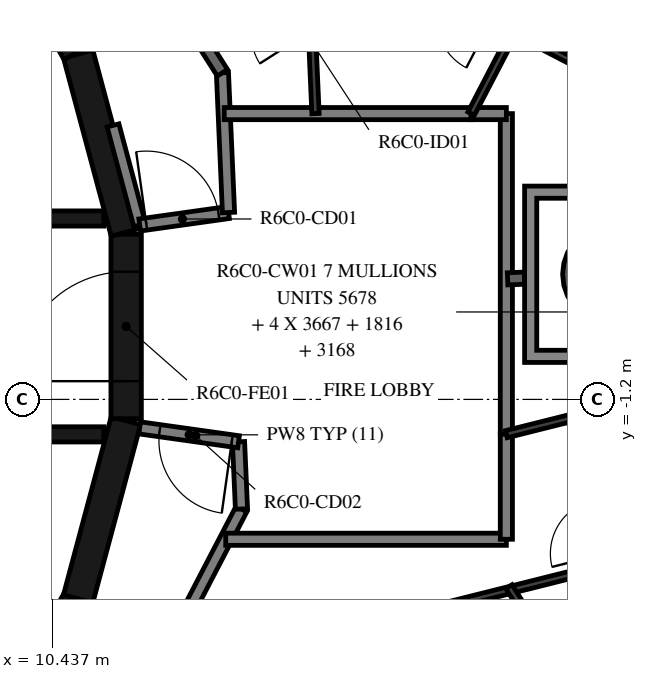
"""IFC4 building model, lengths in metres.
Left out: names, types, materials, properties, quantities, classifications, styles, units other than length and angle.
Written with IfcOpenShell. Run it as: python <this file> out.ifc"""

import sys

from ifc_helpers import new_model, si_unit, direction, frame, frame_2d, origin, origin_2d, place, context, subcontext, project, spatial, polyline, rectangle, hollow_circle, outline, extrude, element, fill, save


model = new_model("IFC4")
c1 = context("Model", 3, precision=1e-05, world=origin(), true_north=direction((0.0, 1.0)))
c2 = subcontext(c1, "Body", "Model", "MODEL_VIEW")
j1 = project(units=[si_unit("LENGTHUNIT", "METRE"), si_unit("PLANEANGLEUNIT", "RADIAN")], contexts=[c1])
p1 = place(None, origin())
s1 = spatial("IfcSite", under=j1, at=p1, CompositionType="ELEMENT")
p2 = place(p1, origin())
s2 = spatial("IfcBuilding", under=s1, at=p2, CompositionType="ELEMENT")
p3 = place(p2, frame((0.0, 0.0, 254.7)))
s3 = spatial("IfcBuildingStorey", under=s2, at=p3, CompositionType="ELEMENT", Elevation=254.7)
p4 = place(p3, frame((19.65, 0.858, -0.38), z_axis=(0.0, 0.0, 1.0), x_axis=(1.0, 0.0, 0.0)))
e1 = element("IfcColumn", 1, at=p4, inside=s3, PredefinedType="COLUMN", context=c2, shape_type="SweptSolid", body=[
    extrude(hollow_circle(Radius=0.825, WallThickness=0.04, at=origin_2d()), origin(), (0.0, 0.0, 1.0), 2.616),
])
for number, where, z_axis, x_axis in (
    (2, (9.329, -7.137, 0.0), (0.0, 0.0, 1.0), (0.5, 0.866, 0.0)),
    (3, (10.858, -4.479, 0.0), (0.0, 0.0, 1.0), (0.259, 0.966, 0.0)),
):
    element("IfcWall", number, at=place(p3, frame(where, z_axis=z_axis, x_axis=x_axis)), inside=s3, PredefinedType="SHEAR", context=c2, shape_type="SweptSolid", body=[
        extrude(rectangle(XDim=3.033, YDim=0.5, at=frame_2d((1.516, 0.0))), origin(), (0.0, 0.0, 1.0), 3.05),
    ])
p5 = place(p3, frame((11.647, -1.516, 0.0), z_axis=(0.0, 0.0, 1.0), x_axis=(0.0, 1.0, 0.0)))
e4 = element("IfcWall", 4, at=p5, inside=s3, PredefinedType="SHEAR", context=c2, shape_type="SweptSolid", body=[
    extrude(rectangle(XDim=3.033, YDim=0.5, at=frame_2d((1.516, 0.0))), origin(), (0.0, 0.0, 1.0), 3.05),
])
p6 = place(p5, frame((0.616, 0.0, 0.0)))
e5 = element("IfcOpeningElement", 5, at=p6, cuts=e4, PredefinedType="OPENING", context=c2, shape_type="SweptSolid", body=[
    extrude(rectangle(XDim=1.8, YDim=2.1, at=frame_2d((0.9, 1.05))), frame((0.0, 0.26, 0.0), z_axis=(0.0, -1.0, 0.0), x_axis=(1.0, 0.0, 0.0)), (0.0, 0.0, 1.0), 0.52),
])
for number, where, z_axis, x_axis in (
    (6, (11.643, 1.55, 0.0), (0.0, 0.0, 1.0), (-0.259, 0.966, 0.0)),
    (7, (10.845, 4.51, 0.0), (0.0, 0.0, 1.0), (-0.5, 0.866, 0.0)),
):
    element("IfcWall", number, at=place(p3, frame(where, z_axis=z_axis, x_axis=x_axis)), inside=s3, PredefinedType="SHEAR", context=c2, shape_type="SweptSolid", body=[
        extrude(rectangle(XDim=3.033, YDim=0.5, at=frame_2d((1.516, 0.0))), origin(), (0.0, 0.0, 1.0), 3.05),
    ])
p7 = place(p3, frame((3.35, 1.775, 0.0), z_axis=(0.0, 0.0, 1.0), x_axis=(1.0, 0.0, 0.0)))
e8 = element("IfcWall", 8, at=p7, inside=s3, PredefinedType="SHEAR", context=c2, shape_type="SweptSolid", body=[
    extrude(rectangle(XDim=7.93, YDim=0.25, at=frame_2d((3.965, 0.0))), origin(), (0.0, 0.0, 1.0), 3.05),
])
p8 = place(p7, frame((0.35, 0.0, 0.0)))
e9 = element("IfcOpeningElement", 9, at=p8, cuts=e8, PredefinedType="OPENING", context=c2, shape_type="SweptSolid", body=[
    extrude(rectangle(XDim=1.2, YDim=2.4, at=frame_2d((0.6, 1.2))), frame((0.0, 0.135, 0.0), z_axis=(0.0, -1.0, 0.0), x_axis=(1.0, 0.0, 0.0)), (0.0, 0.0, 1.0), 0.27),
])
p9 = place(p7, frame((2.5, 0.0, 0.0)))
e10 = element("IfcOpeningElement", 10, at=p9, cuts=e8, PredefinedType="OPENING", context=c2, shape_type="SweptSolid", body=[
    extrude(rectangle(XDim=1.2, YDim=2.4, at=frame_2d((0.6, 1.2))), frame((0.0, 0.135, 0.0), z_axis=(0.0, -1.0, 0.0), x_axis=(1.0, 0.0, 0.0)), (0.0, 0.0, 1.0), 0.27),
])
p10 = place(p7, frame((4.8, 0.0, 0.0)))
e11 = element("IfcOpeningElement", 11, at=p10, cuts=e8, PredefinedType="OPENING", context=c2, shape_type="SweptSolid", body=[
    extrude(rectangle(XDim=0.9, YDim=2.1, at=frame_2d((0.45, 1.05))), frame((0.0, 0.135, 0.0), z_axis=(0.0, -1.0, 0.0), x_axis=(1.0, 0.0, 0.0)), (0.0, 0.0, 1.0), 0.27),
])
p11 = place(p3, frame((3.35, -1.775, 0.0), z_axis=(0.0, 0.0, 1.0), x_axis=(1.0, 0.0, 0.0)))
e12 = element("IfcWall", 12, at=p11, inside=s3, PredefinedType="SHEAR", context=c2, shape_type="SweptSolid", body=[
    extrude(rectangle(XDim=7.93, YDim=0.25, at=frame_2d((3.965, 0.0))), origin(), (0.0, 0.0, 1.0), 3.05),
])
p12 = place(p11, frame((0.4, 0.0, 0.0)))
e13 = element("IfcOpeningElement", 13, at=p12, cuts=e12, PredefinedType="OPENING", context=c2, shape_type="SweptSolid", body=[
    extrude(rectangle(XDim=1.1, YDim=2.4, at=frame_2d((0.55, 1.2))), frame((0.0, 0.135, 0.0), z_axis=(0.0, -1.0, 0.0), x_axis=(1.0, 0.0, 0.0)), (0.0, 0.0, 1.0), 0.27),
])
p13 = place(p11, frame((2.55, 0.0, 0.0)))
e14 = element("IfcOpeningElement", 14, at=p13, cuts=e12, PredefinedType="OPENING", context=c2, shape_type="SweptSolid", body=[
    extrude(rectangle(XDim=1.1, YDim=2.4, at=frame_2d((0.55, 1.2))), frame((0.0, 0.135, 0.0), z_axis=(0.0, -1.0, 0.0), x_axis=(1.0, 0.0, 0.0)), (0.0, 0.0, 1.0), 0.27),
])
p14 = place(p11, frame((4.7, 0.0, 0.0)))
e15 = element("IfcOpeningElement", 15, at=p14, cuts=e12, PredefinedType="OPENING", context=c2, shape_type="SweptSolid", body=[
    extrude(rectangle(XDim=1.1, YDim=2.4, at=frame_2d((0.55, 1.2))), frame((0.0, 0.135, 0.0), z_axis=(0.0, -1.0, 0.0), x_axis=(1.0, 0.0, 0.0)), (0.0, 0.0, 1.0), 0.27),
])
p15 = place(p3, frame((11.87, 1.668, 0.0), z_axis=(0.0, 0.0, 1.0), x_axis=(-0.258836880648, 0.965921047093, 0.0)))
e16 = element("IfcWall", 16, at=p15, inside=s3, PredefinedType="STANDARD", context=c2, shape_type="SweptSolid", body=[
    extrude(rectangle(XDim=1.695, YDim=0.2, at=frame_2d((0.848, 0.0))), origin(), (0.0, 0.0, 1.0), 3.05),
])
p16 = place(p3, frame((11.87, 1.668, 0.0), z_axis=(0.0, 0.0, 1.0), x_axis=(0.990267985606, 0.139173692496, 0.0)))
e17 = element("IfcWall", 17, at=p16, inside=s3, PredefinedType="STANDARD", context=c2, shape_type="SweptSolid", body=[
    extrude(rectangle(XDim=1.475, YDim=0.2, at=frame_2d((0.738, 0.0))), origin(), (0.0, 0.0, 1.0), 3.05),
])
p17 = place(p16, frame((0.11, 0.0, 0.0)))
e18 = element("IfcOpeningElement", 18, at=p17, cuts=e17, PredefinedType="OPENING", context=c2, shape_type="SweptSolid", body=[
    extrude(rectangle(XDim=1.2, YDim=2.1, at=frame_2d((0.6, 1.05))), frame((0.0, 0.11, 0.0), z_axis=(0.0, -1.0, 0.0), x_axis=(1.0, 0.0, 0.0)), (0.0, 0.0, 1.0), 0.22),
])
p18 = place(p3, frame((13.331, 1.874, 0.0), z_axis=(0.0, 0.0, 1.0), x_axis=(-0.043621457762, 0.999048131184, 0.0)))
e19 = element("IfcWall", 19, at=p18, inside=s3, PredefinedType="STANDARD", context=c2, shape_type="SweptSolid", body=[
    extrude(rectangle(XDim=2.3, YDim=0.2, at=frame_2d((1.15, 0.0))), origin(), (0.0, 0.0, 1.0), 3.05),
])
p19 = place(p3, frame((13.231, 4.172, 0.0), z_axis=(0.0, 0.0, 1.0), x_axis=(-0.537304397561, 0.843388394728, 0.0)))
e20 = element("IfcWall", 20, at=p19, inside=s3, PredefinedType="STANDARD", context=c2, shape_type="SweptSolid", body=[
    extrude(rectangle(XDim=7.181, YDim=0.2, at=frame_2d((3.59, 0.0))), origin(), (0.0, 0.0, 1.0), 3.05),
])
p20 = place(p19, frame((2.881, 0.0, 0.0)))
e21 = element("IfcOpeningElement", 21, at=p20, cuts=e20, PredefinedType="OPENING", context=c2, shape_type="SweptSolid", body=[
    extrude(rectangle(XDim=1.0, YDim=2.1, at=frame_2d((0.5, 1.05))), frame((0.0, 0.11, 0.0), z_axis=(0.0, -1.0, 0.0), x_axis=(1.0, 0.0, 0.0)), (0.0, 0.0, 1.0), 0.22),
])
p21 = place(p19, frame((5.681, 0.0, 0.0)))
e22 = element("IfcOpeningElement", 22, at=p21, cuts=e20, PredefinedType="OPENING", context=c2, shape_type="SweptSolid", body=[
    extrude(rectangle(XDim=1.0, YDim=2.1, at=frame_2d((0.5, 1.05))), frame((0.0, 0.11, 0.0), z_axis=(0.0, -1.0, 0.0), x_axis=(1.0, 0.0, 0.0)), (0.0, 0.0, 1.0), 0.22),
])
p22 = place(p3, frame((10.228, -9.372, 0.0), z_axis=(0.0, 0.0, 1.0), x_axis=(0.461759464021, 0.887005184532, 0.0)))
e23 = element("IfcWall", 23, at=p22, inside=s3, PredefinedType="STANDARD", context=c2, shape_type="SweptSolid", body=[
    extrude(rectangle(XDim=7.181, YDim=0.2, at=frame_2d((3.591, 0.0))), origin(), (0.0, 0.0, 1.0), 3.05),
])
p23 = place(p3, frame((13.544, -3.003, 0.0), z_axis=(0.0, 0.0, 1.0), x_axis=(-0.043666917606, 0.999046145234, 0.0)))
e24 = element("IfcWall", 24, at=p23, inside=s3, PredefinedType="STANDARD", context=c2, shape_type="SweptSolid", body=[
    extrude(rectangle(XDim=1.107, YDim=0.2, at=frame_2d((0.553, 0.0))), origin(), (0.0, 0.0, 1.0), 3.05),
])
p24 = place(p3, frame((13.496, -1.897, 0.0), z_axis=(0.0, 0.0, 1.0), x_axis=(-0.99026234641, 0.139213811391, 0.0)))
e25 = element("IfcWall", 25, at=p24, inside=s3, PredefinedType="STANDARD", context=c2, shape_type="SweptSolid", body=[
    extrude(rectangle(XDim=1.641, YDim=0.2, at=frame_2d((0.821, 0.0))), origin(), (0.0, 0.0, 1.0), 3.05),
])
p25 = place(p24, frame((0.11, 0.0, 0.0)))
e26 = element("IfcOpeningElement", 26, at=p25, cuts=e25, PredefinedType="OPENING", context=c2, shape_type="SweptSolid", body=[
    extrude(rectangle(XDim=1.2, YDim=2.1, at=frame_2d((0.6, 1.05))), frame((0.0, 0.11, 0.0), z_axis=(0.0, -1.0, 0.0), x_axis=(1.0, 0.0, 0.0)), (0.0, 0.0, 1.0), 0.22),
])
p26 = place(p3, frame((17.321, 3.5, 0.0), z_axis=(0.0, 0.0, 1.0), x_axis=(-1.0, 0.0, 0.0)))
e27 = element("IfcWall", 27, at=p26, inside=s3, PredefinedType="STANDARD", context=c2, shape_type="SweptSolid", body=[
    extrude(rectangle(XDim=4.061, YDim=0.2, at=frame_2d((2.03, 0.0))), origin(), (0.0, 0.0, 1.0), 3.05),
])
p27 = place(p3, frame((17.9, -1.772, 0.0), z_axis=(0.0, 0.0, 1.0), x_axis=(0.0, 1.0, 0.0)))
e28 = element("IfcWall", 28, at=p27, inside=s3, PredefinedType="STANDARD", context=c2, shape_type="SweptSolid", body=[
    extrude(rectangle(XDim=5.272, YDim=0.2, at=frame_2d((2.636, 0.0))), origin(), (0.0, 0.0, 1.0), 3.05),
])
p28 = place(p3, frame((17.9, 3.5, 0.0), z_axis=(0.0, 0.0, 1.0), x_axis=(-1.0, 0.0, 0.0)))
e29 = element("IfcWall", 29, at=p28, inside=s3, PredefinedType="STANDARD", context=c2, shape_type="SweptSolid", body=[
    extrude(rectangle(XDim=0.579, YDim=0.2, at=frame_2d((0.29, 0.0))), origin(), (0.0, 0.0, 1.0), 3.05),
])
p29 = place(p3, frame((13.285, -3.5, 0.0), z_axis=(0.0, 0.0, 1.0), x_axis=(1.0, 0.0, 0.0)))
e30 = element("IfcWall", 30, at=p29, inside=s3, PredefinedType="STANDARD", context=c2, shape_type="SweptSolid", body=[
    extrude(rectangle(XDim=4.615, YDim=0.2, at=frame_2d((2.308, 0.0))), origin(), (0.0, 0.0, 1.0), 3.05),
])
p30 = place(p3, frame((17.9, -3.5, 0.0), z_axis=(0.0, 0.0, 1.0), x_axis=(0.0, 1.0, 0.0)))
e31 = element("IfcWall", 31, at=p30, inside=s3, PredefinedType="STANDARD", context=c2, shape_type="SweptSolid", body=[
    extrude(rectangle(XDim=1.728, YDim=0.2, at=frame_2d((0.864, 0.0))), origin(), (0.0, 0.0, 1.0), 3.05),
])
p31 = place(p3, frame((17.92, 0.782, 0.0), z_axis=(0.0, 0.0, 1.0), x_axis=(0.999051221661, 0.04355061995, 0.0)))
e32 = element("IfcWall", 32, at=p31, inside=s3, PredefinedType="STANDARD", context=c2, shape_type="SweptSolid", body=[
    extrude(rectangle(XDim=0.28, YDim=0.2, at=frame_2d((0.14, 0.0))), origin(), (0.0, 0.0, 1.0), 3.05),
])
p32 = place(p3, frame((14.761, 3.5, 0.0), z_axis=(0.0, 0.0, 1.0), x_axis=(-0.04369750018, 0.999044808043, 0.0)))
e33 = element("IfcWall", 33, at=p32, inside=s3, PredefinedType="PARTITIONING", context=c2, shape_type="SweptSolid", body=[
    extrude(rectangle(XDim=1.14, YDim=0.12, at=frame_2d((0.57, 0.0))), origin(), (0.0, 0.0, 1.0), 3.05),
])
p33 = place(p3, frame((18.028, 4.859, 0.0), z_axis=(0.0, 0.0, 1.0), x_axis=(0.88702512027, -0.46172116695, 0.0)))
e34 = element("IfcWall", 34, at=p33, inside=s3, PredefinedType="PARTITIONING", context=c2, shape_type="SweptSolid", body=[
    extrude(rectangle(XDim=2.983, YDim=0.12, at=frame_2d((1.492, 0.0))), origin(), (0.0, 0.0, 1.0), 3.05),
])
p34 = place(p33, frame((1.0, 0.0, 0.0)))
e35 = element("IfcOpeningElement", 35, at=p34, cuts=e34, PredefinedType="OPENING", context=c2, shape_type="SweptSolid", body=[
    extrude(rectangle(XDim=0.8, YDim=2.1, at=frame_2d((0.4, 1.05))), frame((0.0, 0.07, 0.0), z_axis=(0.0, -1.0, 0.0), x_axis=(1.0, 0.0, 0.0)), (0.0, 0.0, 1.0), 0.14),
])
p35 = place(p3, frame((18.028, 4.859, 0.0), z_axis=(0.0, 0.0, 1.0), x_axis=(-0.461688901614, -0.887041914526, 0.0)))
e36 = element("IfcWall", 36, at=p35, inside=s3, PredefinedType="PARTITIONING", context=c2, shape_type="SweptSolid", body=[
    extrude(rectangle(XDim=1.532, YDim=0.12, at=frame_2d((0.766, 0.0))), origin(), (0.0, 0.0, 1.0), 3.05),
])
p36 = place(p3, frame((14.029, -5.32, 0.0), z_axis=(0.0, 0.0, 1.0), x_axis=(0.969999099814, 0.243108507378, 0.0)))
e37 = element("IfcWall", 37, at=p36, inside=s3, PredefinedType="PARTITIONING", context=c2, shape_type="SweptSolid", body=[
    extrude(rectangle(XDim=5.715, YDim=0.12, at=frame_2d((2.857, 0.0))), origin(), (0.0, 0.0, 1.0), 3.05),
])
p37 = place(p3, frame((18.965, -1.505, 0.0), z_axis=(0.0, 0.0, 1.0), x_axis=(-0.969998406835, -0.243111272339, 0.0)))
e38 = element("IfcWall", 38, at=p37, inside=s3, PredefinedType="PARTITIONING", context=c2, shape_type="SweptSolid", body=[
    extrude(rectangle(XDim=1.098, YDim=0.12, at=frame_2d((0.549, 0.0))), origin(), (0.0, 0.0, 1.0), 3.05),
])
p38 = place(p3, frame((21.837, -2.966, 0.0), z_axis=(0.0, 0.0, 1.0), x_axis=(-0.843394529709, -0.537294767569, 0.0)))
e39 = element("IfcWall", 39, at=p38, inside=s3, PredefinedType="PARTITIONING", context=c2, shape_type="SweptSolid", body=[
    extrude(rectangle(XDim=11.678, YDim=0.12, at=frame_2d((5.839, 0.0))), origin(), (0.0, 0.0, 1.0), 3.05),
])
p39 = place(p38, frame((0.2, 0.0, 0.0)))
e40 = element("IfcOpeningElement", 40, at=p39, cuts=e39, PredefinedType="OPENING", context=c2, shape_type="SweptSolid", body=[
    extrude(rectangle(XDim=0.9, YDim=2.1, at=frame_2d((0.45, 1.05))), frame((0.0, 0.07, 0.0), z_axis=(0.0, -1.0, 0.0), x_axis=(1.0, 0.0, 0.0)), (0.0, 0.0, 1.0), 0.14),
])
p40 = place(p3, frame((18.503, -5.161, 0.0), z_axis=(0.0, 0.0, 1.0), x_axis=(-0.537208231854, 0.843449652101, 0.0)))
e41 = element("IfcWall", 41, at=p40, inside=s3, PredefinedType="PARTITIONING", context=c2, shape_type="SweptSolid", body=[
    extrude(rectangle(XDim=1.044, YDim=0.12, at=frame_2d((0.522, 0.0))), origin(), (0.0, 0.0, 1.0), 3.05),
])
p41 = place(p3, origin())
e42 = element("IfcWall", 42, at=p41, inside=s3, PredefinedType="STANDARD", context=c2, shape_type="SweptSolid", body=[
    extrude(outline(polyline([(21.1, 2.308), (21.1, -0.592), (18.2, -0.592), (18.2, 2.308), (21.1, 2.308)]), holes=[polyline([(18.4, -0.392), (20.9, -0.392), (20.9, 2.108), (18.4, 2.108), (18.4, -0.392)])]), origin(), (0.0, 0.0, 1.0), 3.05),
])
p42 = place(p6, origin())
e43 = element("IfcDoor", 43, at=p42, inside=s3, OperationType="DOUBLE_DOOR_SINGLE_SWING", PredefinedType="DOOR", context=c2, shape_type="SweptSolid", body=[
    extrude(rectangle(XDim=1.8, YDim=2.1, at=frame_2d((0.9, 1.05))), frame((0.0, 0.025, 0.0), z_axis=(0.0, -1.0, 0.0), x_axis=(1.0, 0.0, 0.0)), (0.0, 0.0, 1.0), 0.05),
])
fill(e5, e43)
p43 = place(p17, origin())
e44 = element("IfcDoor", 44, at=p43, inside=s3, OperationType="DOUBLE_DOOR_SINGLE_SWING", PredefinedType="DOOR", context=c2, shape_type="SweptSolid", body=[
    extrude(rectangle(XDim=1.2, YDim=2.1, at=frame_2d((0.6, 1.05))), frame((0.0, 0.025, 0.0), z_axis=(0.0, -1.0, 0.0), x_axis=(1.0, 0.0, 0.0)), (0.0, 0.0, 1.0), 0.05),
])
fill(e18, e44)
p44 = place(p25, origin())
e45 = element("IfcDoor", 45, at=p44, inside=s3, OperationType="DOUBLE_DOOR_SINGLE_SWING", PredefinedType="DOOR", context=c2, shape_type="SweptSolid", body=[
    extrude(rectangle(XDim=1.2, YDim=2.1, at=frame_2d((0.6, 1.05))), frame((0.0, 0.025, 0.0), z_axis=(0.0, -1.0, 0.0), x_axis=(1.0, 0.0, 0.0)), (0.0, 0.0, 1.0), 0.05),
])
fill(e26, e45)
save(model, sys.argv[1])
